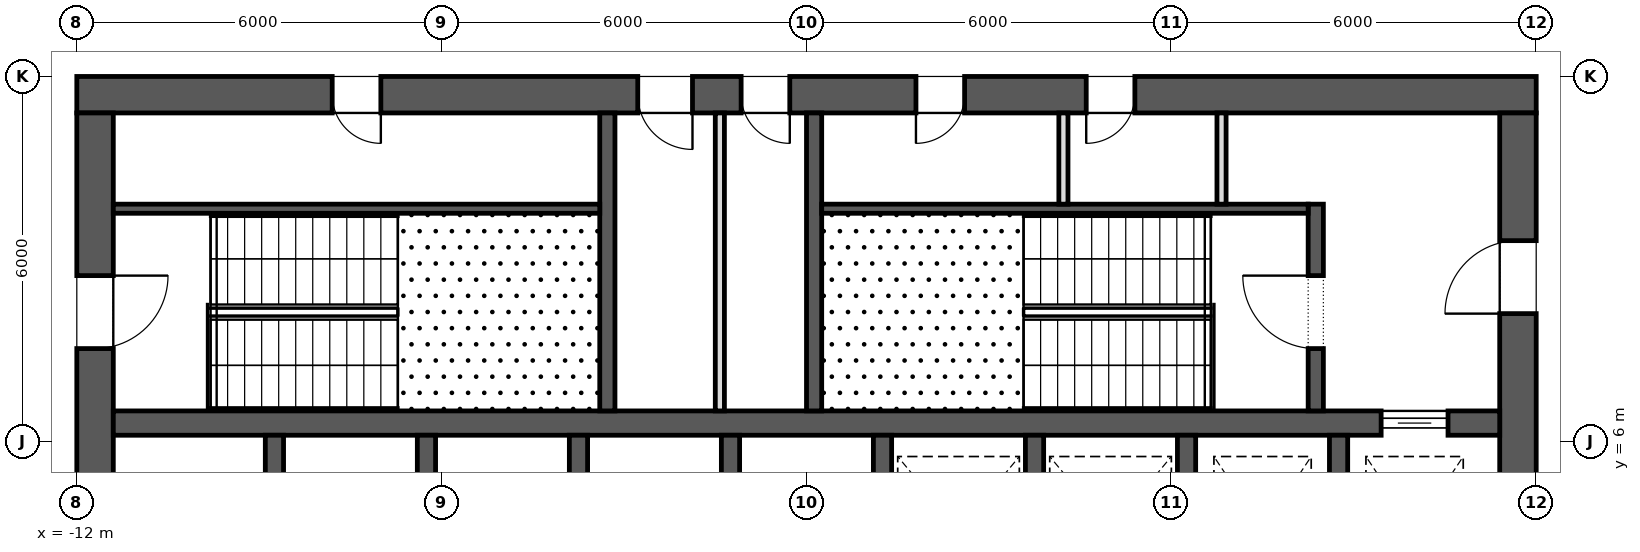
"""IFC4 building model, lengths in metres.
Left out: names, types, materials, properties, quantities, classifications, styles, units other than length and angle.
Written with IfcOpenShell. Run it as: python <this file> out.ifc"""

import sys

from ifc_helpers import new_model, si_unit, direction, frame, frame_2d, origin, place, context, subcontext, project, spatial, rectangle, extrude, element, fill, save


model = new_model("IFC4")
c1 = context("Model", 3, precision=1e-05, world=origin(), true_north=direction((0.0, 1.0)))
c2 = subcontext(c1, "Body", "Model", "MODEL_VIEW")
j1 = project(units=[si_unit("LENGTHUNIT", "METRE"), si_unit("PLANEANGLEUNIT", "RADIAN")], contexts=[c1])
p1 = place(None, origin())
s1 = spatial("IfcSite", under=j1, at=p1, CompositionType="ELEMENT")
p2 = place(p1, origin())
s2 = spatial("IfcBuilding", under=s1, at=p2, CompositionType="ELEMENT")
p3 = place(p2, frame((0.0, 0.0, 125.5)))
s3 = spatial("IfcBuildingStorey", under=s2, at=p3, CompositionType="ELEMENT", Elevation=125.5)
p4 = place(p3, frame((-12.0, 11.7, 0.0), z_axis=(0.0, 0.0, 1.0), x_axis=(1.0, 0.0, 0.0)))
e1 = element("IfcWall", 1, at=p4, inside=s3, PredefinedType="SHEAR", context=c2, shape_type="SweptSolid", body=[
    extrude(rectangle(XDim=24.0, YDim=0.6, at=frame_2d((12.0, 0.0))), origin(), (0.0, 0.0, 1.0), 4.2),
])
p5 = place(p4, frame((9.225, 0.0, 0.0)))
e2 = element("IfcOpeningElement", 2, at=p5, cuts=e1, PredefinedType="OPENING", context=c2, shape_type="SweptSolid", body=[
    extrude(rectangle(XDim=0.9, YDim=2.1, at=frame_2d((0.45, 1.05))), frame((0.0, 0.312, 0.0), z_axis=(0.0, -1.0, 0.0), x_axis=(1.0, 0.0, 0.0)), (0.0, 0.0, 1.0), 0.624),
])
p6 = place(p4, frame((10.925, 0.0, 0.0)))
e3 = element("IfcOpeningElement", 3, at=p6, cuts=e1, PredefinedType="OPENING", context=c2, shape_type="SweptSolid", body=[
    extrude(rectangle(XDim=0.8, YDim=2.1, at=frame_2d((0.4, 1.05))), frame((0.0, 0.312, 0.0), z_axis=(0.0, -1.0, 0.0), x_axis=(1.0, 0.0, 0.0)), (0.0, 0.0, 1.0), 0.624),
])
p7 = place(p4, frame((4.2, 0.0, 0.0)))
e4 = element("IfcOpeningElement", 4, at=p7, cuts=e1, PredefinedType="OPENING", context=c2, shape_type="SweptSolid", body=[
    extrude(rectangle(XDim=0.8, YDim=2.1, at=frame_2d((0.4, 1.05))), frame((0.0, 0.312, 0.0), z_axis=(0.0, -1.0, 0.0), x_axis=(1.0, 0.0, 0.0)), (0.0, 0.0, 1.0), 0.624),
])
p8 = place(p4, frame((13.8, 0.0, 0.0)))
e5 = element("IfcOpeningElement", 5, at=p8, cuts=e1, PredefinedType="OPENING", context=c2, shape_type="SweptSolid", body=[
    extrude(rectangle(XDim=0.8, YDim=2.1, at=frame_2d((0.4, 1.05))), frame((0.0, 0.312, 0.0), z_axis=(0.0, -1.0, 0.0), x_axis=(1.0, 0.0, 0.0)), (0.0, 0.0, 1.0), 0.624),
])
p9 = place(p4, frame((16.6, 0.0, 0.0)))
e6 = element("IfcOpeningElement", 6, at=p9, cuts=e1, PredefinedType="OPENING", context=c2, shape_type="SweptSolid", body=[
    extrude(rectangle(XDim=0.8, YDim=2.1, at=frame_2d((0.4, 1.05))), frame((0.0, 0.312, 0.0), z_axis=(0.0, -1.0, 0.0), x_axis=(1.0, 0.0, 0.0)), (0.0, 0.0, 1.0), 0.624),
])
p10 = place(p3, frame((11.7, -11.4, 0.0), z_axis=(0.0, 0.0, 1.0), x_axis=(0.0, 1.0, 0.0)))
e7 = element("IfcWall", 7, at=p10, inside=s3, PredefinedType="SHEAR", context=c2, shape_type="SweptSolid", body=[
    extrude(rectangle(XDim=22.8, YDim=0.6, at=frame_2d((11.4, 0.0))), origin(), (0.0, 0.0, 1.0), 4.2),
])
p11 = place(p10, frame((10.2, 0.0, 0.0)))
e8 = element("IfcOpeningElement", 8, at=p11, cuts=e7, PredefinedType="OPENING", context=c2, shape_type="SweptSolid", body=[
    extrude(rectangle(XDim=2.4, YDim=2.1, at=frame_2d((1.2, 1.05))), frame((0.0, 0.312, 0.0), z_axis=(0.0, -1.0, 0.0), x_axis=(1.0, 0.0, 0.0)), (0.0, 0.0, 1.0), 0.624),
])
p12 = place(p10, frame((19.5, 0.0, 0.0)))
e9 = element("IfcOpeningElement", 9, at=p12, cuts=e7, PredefinedType="OPENING", context=c2, shape_type="SweptSolid", body=[
    extrude(rectangle(XDim=1.2, YDim=2.1, at=frame_2d((0.6, 1.05))), frame((0.0, 0.312, 0.0), z_axis=(0.0, -1.0, 0.0), x_axis=(1.0, 0.0, 0.0)), (0.0, 0.0, 1.0), 0.624),
])
p13 = place(p10, frame((2.1, 0.0, 0.0)))
e10 = element("IfcOpeningElement", 10, at=p13, cuts=e7, PredefinedType="OPENING", context=c2, shape_type="SweptSolid", body=[
    extrude(rectangle(XDim=1.2, YDim=2.1, at=frame_2d((0.6, 1.05))), frame((0.0, 0.312, 0.0), z_axis=(0.0, -1.0, 0.0), x_axis=(1.0, 0.0, 0.0)), (0.0, 0.0, 1.0), 0.624),
])
p14 = place(p3, frame((-11.7, -11.4, 0.0), z_axis=(0.0, 0.0, 1.0), x_axis=(0.0, 1.0, 0.0)))
e11 = element("IfcWall", 11, at=p14, inside=s3, PredefinedType="SHEAR", context=c2, shape_type="SweptSolid", body=[
    extrude(rectangle(XDim=22.8, YDim=0.6, at=frame_2d((11.4, 0.0))), origin(), (0.0, 0.0, 1.0), 4.2),
])
p15 = place(p14, frame((10.2, 0.0, 0.0)))
e12 = element("IfcOpeningElement", 12, at=p15, cuts=e11, PredefinedType="OPENING", context=c2, shape_type="SweptSolid", body=[
    extrude(rectangle(XDim=2.4, YDim=2.1, at=frame_2d((1.2, 1.05))), frame((0.0, 0.312, 0.0), z_axis=(0.0, -1.0, 0.0), x_axis=(1.0, 0.0, 0.0)), (0.0, 0.0, 1.0), 0.624),
])
p16 = place(p14, frame((18.925, 0.0, 0.0)))
e13 = element("IfcOpeningElement", 13, at=p16, cuts=e11, PredefinedType="OPENING", context=c2, shape_type="SweptSolid", body=[
    extrude(rectangle(XDim=1.2, YDim=2.1, at=frame_2d((0.6, 1.05))), frame((0.0, 0.312, 0.0), z_axis=(0.0, -1.0, 0.0), x_axis=(1.0, 0.0, 0.0)), (0.0, 0.0, 1.0), 0.624),
])
p17 = place(p14, frame((2.675, 0.0, 0.0)))
e14 = element("IfcOpeningElement", 14, at=p17, cuts=e11, PredefinedType="OPENING", context=c2, shape_type="SweptSolid", body=[
    extrude(rectangle(XDim=1.2, YDim=2.1, at=frame_2d((0.6, 1.05))), frame((0.0, 0.312, 0.0), z_axis=(0.0, -1.0, 0.0), x_axis=(1.0, 0.0, 0.0)), (0.0, 0.0, 1.0), 0.624),
])
p18 = place(p3, frame((-11.4, 6.3, 0.0), z_axis=(0.0, 0.0, 1.0), x_axis=(1.0, 0.0, 0.0)))
e15 = element("IfcWall", 15, at=p18, inside=s3, PredefinedType="SHEAR", context=c2, shape_type="SweptSolid", body=[
    extrude(rectangle(XDim=22.8, YDim=0.4, at=frame_2d((11.4, 0.0))), origin(), (0.0, 0.0, 1.0), 4.2),
])
p19 = place(p18, frame((20.85, 0.0, 0.0)))
e16 = element("IfcOpeningElement", 16, at=p19, cuts=e15, PredefinedType="OPENING", context=c2, shape_type="SweptSolid", body=[
    extrude(rectangle(XDim=1.1, YDim=2.1, at=frame_2d((0.55, 1.05))), frame((0.0, 0.212, 0.0), z_axis=(0.0, -1.0, 0.0), x_axis=(1.0, 0.0, 0.0)), (0.0, 0.0, 1.0), 0.424),
])
for number, where, z_axis, x_axis in (
    (17, (-8.75, 3.2, 0.0), (0.0, 0.0, 1.0), (0.0, 1.0, 0.0)),
    (18, (-6.25, 3.2, 0.0), (0.0, 0.0, 1.0), (0.0, 1.0, 0.0)),
    (19, (-3.75, 3.2, 0.0), (0.0, 0.0, 1.0), (0.0, 1.0, 0.0)),
    (20, (-1.25, 3.2, 0.0), (0.0, 0.0, 1.0), (0.0, 1.0, 0.0)),
    (21, (1.25, 3.2, 0.0), (0.0, 0.0, 1.0), (0.0, 1.0, 0.0)),
    (22, (3.75, 3.2, 0.0), (0.0, 0.0, 1.0), (0.0, 1.0, 0.0)),
    (23, (6.25, 3.2, 0.0), (0.0, 0.0, 1.0), (0.0, 1.0, 0.0)),
    (24, (8.75, 3.2, 0.0), (0.0, 0.0, 1.0), (0.0, 1.0, 0.0)),
):
    element("IfcWall", number, at=place(p3, frame(where, z_axis=z_axis, x_axis=x_axis)), inside=s3, PredefinedType="SHEAR", context=c2, shape_type="SweptSolid", body=[
        extrude(rectangle(XDim=2.9, YDim=0.3, at=frame_2d((1.45, 0.0))), origin(), (0.0, 0.0, 1.0), 4.2),
    ])
for number, where, z_axis, x_axis in (
    (25, (-3.275, 6.5, 0.0), (0.0, 0.0, 1.0), (0.0, 1.0, 0.0)),
    (26, (0.125, 6.5, 0.0), (0.0, 0.0, 1.0), (0.0, 1.0, 0.0)),
):
    element("IfcWall", number, at=place(p3, frame(where, z_axis=z_axis, x_axis=x_axis)), inside=s3, PredefinedType="SHEAR", context=c2, shape_type="SweptSolid", body=[
        extrude(rectangle(XDim=4.9, YDim=0.25, at=frame_2d((2.45, 0.0))), origin(), (0.0, 0.0, 1.0), 3.9),
    ])
p20 = place(p3, frame((8.375, 6.5, 0.0), z_axis=(0.0, 0.0, 1.0), x_axis=(0.0, 1.0, 0.0)))
e27 = element("IfcWall", 27, at=p20, inside=s3, PredefinedType="SHEAR", context=c2, shape_type="SweptSolid", body=[
    extrude(rectangle(XDim=3.4, YDim=0.25, at=frame_2d((1.7, 0.0))), origin(), (0.0, 0.0, 1.0), 3.9),
])
p21 = place(p20, frame((1.025, 0.0, 0.0)))
e28 = element("IfcOpeningElement", 28, at=p21, cuts=e27, PredefinedType="OPENING", context=c2, shape_type="SweptSolid", body=[
    extrude(rectangle(XDim=1.2, YDim=2.1, at=frame_2d((0.6, 1.05))), frame((0.0, 0.137, 0.0), z_axis=(0.0, -1.0, 0.0), x_axis=(1.0, 0.0, 0.0)), (0.0, 0.0, 1.0), 0.274),
])
for number, where, z_axis, x_axis in (
    (29, (-11.4, 9.825, 0.0), (0.0, 0.0, 1.0), (1.0, 0.0, 0.0)),
    (30, (0.25, 9.825, 0.0), (0.0, 0.0, 1.0), (1.0, 0.0, 0.0)),
):
    element("IfcWall", number, at=place(p3, frame(where, z_axis=z_axis, x_axis=x_axis)), inside=s3, PredefinedType="SHEAR", context=c2, shape_type="SweptSolid", body=[
        extrude(rectangle(XDim=8.0, YDim=0.15, at=frame_2d((4.0, 0.0))), origin(), (0.0, 0.0, 1.0), 3.9),
    ])
p22 = place(p3, frame((-1.425, 6.5, 0.0), z_axis=(0.0, 0.0, 1.0), x_axis=(0.0, 1.0, 0.0)))
e31 = element("IfcWall", 31, at=p22, inside=s3, PredefinedType="PARTITIONING", context=c2, shape_type="SweptSolid", body=[
    extrude(rectangle(XDim=4.9, YDim=0.15, at=frame_2d((2.45, 0.0))), origin(), (0.0, 0.0, 1.0), 3.9),
])
for number, where, z_axis, x_axis in (
    (32, (4.225, 9.9, 0.0), (0.0, 0.0, 1.0), (0.0, 1.0, 0.0)),
    (33, (6.825, 9.9, 0.0), (0.0, 0.0, 1.0), (0.0, 1.0, 0.0)),
):
    element("IfcWall", number, at=place(p3, frame(where, z_axis=z_axis, x_axis=x_axis)), inside=s3, PredefinedType="PARTITIONING", context=c2, shape_type="SweptSolid", body=[
        extrude(rectangle(XDim=1.5, YDim=0.15, at=frame_2d((0.75, 0.0))), origin(), (0.0, 0.0, 1.0), 3.9),
    ])
p23 = place(p19, origin())
e34 = element("IfcDoor", 34, at=p23, inside=s3, OperationType="SLIDING_TO_LEFT", PredefinedType="DOOR", context=c2, shape_type="SweptSolid", body=[
    extrude(rectangle(XDim=1.1, YDim=2.1, at=frame_2d((0.55, 1.05))), frame((0.0, 0.025, 0.0), z_axis=(0.0, -1.0, 0.0), x_axis=(1.0, 0.0, 0.0)), (0.0, 0.0, 1.0), 0.05),
])
fill(e16, e34)
p24 = place(p16, frame((1.2, 0.0, 0.0), z_axis=(0.0, 0.0, 1.0), x_axis=(-1.0, 0.0, 0.0)))
e35 = element("IfcDoor", 35, at=p24, inside=s3, OperationType="SINGLE_SWING_RIGHT", PredefinedType="DOOR", context=c2, shape_type="SweptSolid", body=[
    extrude(rectangle(XDim=1.2, YDim=2.1, at=frame_2d((0.6, 1.05))), frame((0.0, 0.025, 0.0), z_axis=(0.0, -1.0, 0.0), x_axis=(1.0, 0.0, 0.0)), (0.0, 0.0, 1.0), 0.05),
])
fill(e13, e35)
p25 = place(p21, origin())
e36 = element("IfcDoor", 36, at=p25, inside=s3, OperationType="SINGLE_SWING_LEFT", PredefinedType="DOOR", context=c2, shape_type="SweptSolid", body=[
    extrude(rectangle(XDim=1.2, YDim=2.1, at=frame_2d((0.6, 1.05))), frame((0.0, 0.025, 0.0), z_axis=(0.0, -1.0, 0.0), x_axis=(1.0, 0.0, 0.0)), (0.0, 0.0, 1.0), 0.05),
])
fill(e28, e36)
p26 = place(p12, origin())
e37 = element("IfcDoor", 37, at=p26, inside=s3, OperationType="SINGLE_SWING_RIGHT", PredefinedType="DOOR", context=c2, shape_type="SweptSolid", body=[
    extrude(rectangle(XDim=1.2, YDim=2.1, at=frame_2d((0.6, 1.05))), frame((0.0, 0.025, 0.0), z_axis=(0.0, -1.0, 0.0), x_axis=(1.0, 0.0, 0.0)), (0.0, 0.0, 1.0), 0.05),
])
fill(e9, e37)
p27 = place(p5, frame((0.9, 0.0, 0.0), z_axis=(0.0, 0.0, 1.0), x_axis=(-1.0, 0.0, 0.0)))
e38 = element("IfcDoor", 38, at=p27, inside=s3, OperationType="SINGLE_SWING_RIGHT", PredefinedType="DOOR", context=c2, shape_type="SweptSolid", body=[
    extrude(rectangle(XDim=0.9, YDim=2.1, at=frame_2d((0.45, 1.05))), frame((0.0, 0.025, 0.0), z_axis=(0.0, -1.0, 0.0), x_axis=(1.0, 0.0, 0.0)), (0.0, 0.0, 1.0), 0.05),
])
fill(e2, e38)
p28 = place(p6, frame((0.8, 0.0, 0.0), z_axis=(0.0, 0.0, 1.0), x_axis=(-1.0, 0.0, 0.0)))
e39 = element("IfcDoor", 39, at=p28, inside=s3, OperationType="SINGLE_SWING_RIGHT", PredefinedType="DOOR", context=c2, shape_type="SweptSolid", body=[
    extrude(rectangle(XDim=0.8, YDim=2.1, at=frame_2d((0.4, 1.05))), frame((0.0, 0.025, 0.0), z_axis=(0.0, -1.0, 0.0), x_axis=(1.0, 0.0, 0.0)), (0.0, 0.0, 1.0), 0.05),
])
fill(e3, e39)
p29 = place(p7, frame((0.8, 0.0, 0.0), z_axis=(0.0, 0.0, 1.0), x_axis=(-1.0, 0.0, 0.0)))
e40 = element("IfcDoor", 40, at=p29, inside=s3, OperationType="SINGLE_SWING_RIGHT", PredefinedType="DOOR", context=c2, shape_type="SweptSolid", body=[
    extrude(rectangle(XDim=0.8, YDim=2.1, at=frame_2d((0.4, 1.05))), frame((0.0, 0.025, 0.0), z_axis=(0.0, -1.0, 0.0), x_axis=(1.0, 0.0, 0.0)), (0.0, 0.0, 1.0), 0.05),
])
fill(e4, e40)
p30 = place(p8, frame((0.8, 0.0, 0.0), z_axis=(0.0, 0.0, 1.0), x_axis=(-1.0, 0.0, 0.0)))
e41 = element("IfcDoor", 41, at=p30, inside=s3, OperationType="SINGLE_SWING_LEFT", PredefinedType="DOOR", context=c2, shape_type="SweptSolid", body=[
    extrude(rectangle(XDim=0.8, YDim=2.1, at=frame_2d((0.4, 1.05))), frame((0.0, 0.025, 0.0), z_axis=(0.0, -1.0, 0.0), x_axis=(1.0, 0.0, 0.0)), (0.0, 0.0, 1.0), 0.05),
])
fill(e5, e41)
p31 = place(p9, frame((0.8, 0.0, 0.0), z_axis=(0.0, 0.0, 1.0), x_axis=(-1.0, 0.0, 0.0)))
e42 = element("IfcDoor", 42, at=p31, inside=s3, OperationType="SINGLE_SWING_LEFT", PredefinedType="DOOR", context=c2, shape_type="SweptSolid", body=[
    extrude(rectangle(XDim=0.8, YDim=2.1, at=frame_2d((0.4, 1.05))), frame((0.0, 0.025, 0.0), z_axis=(0.0, -1.0, 0.0), x_axis=(1.0, 0.0, 0.0)), (0.0, 0.0, 1.0), 0.05),
])
fill(e6, e42)
save(model, sys.argv[1])
